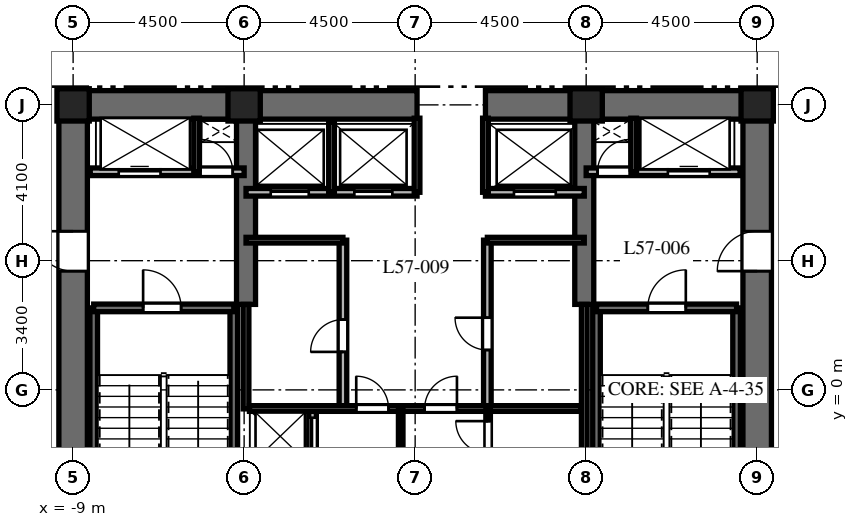
"""IFC4 building model, lengths in metres.
Left out: names, types, materials, properties, quantities, classifications, styles, units other than length and angle.
Written with IfcOpenShell. Run it as: python <this file> out.ifc"""

import sys

from ifc_helpers import new_model, si_unit, direction, frame, frame_2d, origin, origin_2d, place, context, subcontext, project, spatial, rectangle, extrude, element, fill, save


model = new_model("IFC4")
c1 = context("Model", 3, precision=1e-05, world=origin(), true_north=direction((0.0, 1.0)))
c2 = subcontext(c1, "Body", "Model", "MODEL_VIEW")
j1 = project(units=[si_unit("LENGTHUNIT", "METRE"), si_unit("PLANEANGLEUNIT", "RADIAN")], contexts=[c1])
p1 = place(None, origin())
s1 = spatial("IfcSite", under=j1, at=p1, CompositionType="ELEMENT")
p2 = place(p1, origin())
s2 = spatial("IfcBuilding", under=s1, at=p2, CompositionType="ELEMENT")
p3 = place(p2, frame((0.0, 0.0, 229.3)))
s3 = spatial("IfcBuildingStorey", under=s2, at=p3, CompositionType="ELEMENT", Elevation=229.3)
p4 = place(p3, frame((-9.375, 7.5, 0.0), z_axis=(0.0, 0.0, 1.0), x_axis=(1.0, 0.0, 0.0)))
e1 = element("IfcWall", 1, at=p4, inside=s3, PredefinedType="SHEAR", context=c2, shape_type="SweptSolid", body=[
    extrude(rectangle(XDim=9.425, YDim=0.75, at=frame_2d((4.712, 0.0))), origin(), (0.0, 0.0, 1.0), 3.8),
])
p5 = place(p3, frame((1.85, 7.5, 0.0), z_axis=(0.0, 0.0, 1.0), x_axis=(1.0, 0.0, 0.0)))
e2 = element("IfcWall", 2, at=p5, inside=s3, PredefinedType="SHEAR", context=c2, shape_type="SweptSolid", body=[
    extrude(rectangle(XDim=7.525, YDim=0.75, at=frame_2d((3.762, 0.0))), origin(), (0.0, 0.0, 1.0), 3.8),
])
p6 = place(p3, frame((-9.0, -7.125, 0.0), z_axis=(0.0, 0.0, 1.0), x_axis=(0.0, 1.0, 0.0)))
e3 = element("IfcWall", 3, at=p6, inside=s3, PredefinedType="SHEAR", context=c2, shape_type="SweptSolid", body=[
    extrude(rectangle(XDim=14.25, YDim=0.75, at=frame_2d((7.125, 0.0))), origin(), (0.0, 0.0, 1.0), 3.8),
])
p7 = place(p6, frame((10.25, 0.0, 0.0)))
e4 = element("IfcOpeningElement", 4, at=p7, cuts=e3, PredefinedType="OPENING", context=c2, shape_type="SweptSolid", body=[
    extrude(rectangle(XDim=1.05, YDim=2.15, at=frame_2d((0.525, 1.075))), frame((0.0, 0.385, 0.0), z_axis=(0.0, -1.0, 0.0), x_axis=(1.0, 0.0, 0.0)), (0.0, 0.0, 1.0), 0.77),
])
p8 = place(p3, frame((9.0, -7.125, 0.0), z_axis=(0.0, 0.0, 1.0), x_axis=(0.0, 1.0, 0.0)))
e5 = element("IfcWall", 5, at=p8, inside=s3, PredefinedType="SHEAR", context=c2, shape_type="SweptSolid", body=[
    extrude(rectangle(XDim=14.25, YDim=0.75, at=frame_2d((7.125, 0.0))), origin(), (0.0, 0.0, 1.0), 3.8),
])
p9 = place(p8, frame((10.25, 0.0, 0.0)))
e6 = element("IfcOpeningElement", 6, at=p9, cuts=e5, PredefinedType="OPENING", context=c2, shape_type="SweptSolid", body=[
    extrude(rectangle(XDim=1.05, YDim=2.15, at=frame_2d((0.525, 1.075))), frame((0.0, 0.385, 0.0), z_axis=(0.0, -1.0, 0.0), x_axis=(1.0, 0.0, 0.0)), (0.0, 0.0, 1.0), 0.77),
])
for number, where, z_axis, x_axis in (
    (7, (-4.45, 2.25, 0.0), (0.0, 0.0, 1.0), (0.0, 1.0, 0.0)),
    (8, (4.45, 2.25, 0.0), (0.0, 0.0, 1.0), (0.0, 1.0, 0.0)),
):
    element("IfcWall", number, at=place(p3, frame(where, z_axis=z_axis, x_axis=x_axis)), inside=s3, PredefinedType="SHEAR", context=c2, shape_type="SweptSolid", body=[
        extrude(rectangle(XDim=4.875, YDim=0.5, at=frame_2d((2.438, 0.0))), origin(), (0.0, 0.0, 1.0), 3.8),
    ])
for number, where, z_axis, x_axis in (
    (9, (-8.458, -6.985, 0.0), (0.0, 0.0, 1.0), (0.0, 1.0, 0.0)),
    (10, (-4.772, -6.985, 0.0), (0.0, 0.0, 1.0), (0.0, 1.0, 0.0)),
):
    element("IfcWall", number, at=place(p3, frame(where, z_axis=z_axis, x_axis=x_axis)), inside=s3, PredefinedType="SHEAR", context=c2, shape_type="SweptSolid", body=[
        extrude(rectangle(XDim=9.143, YDim=0.2, at=frame_2d((4.572, 0.0))), origin(), (0.0, 0.0, 1.0), 3.8),
    ])
p10 = place(p3, frame((-8.458, 2.158, 0.0), z_axis=(0.0, 0.0, 1.0), x_axis=(1.0, 0.0, 0.0)))
e11 = element("IfcWall", 11, at=p10, inside=s3, PredefinedType="SHEAR", context=c2, shape_type="SweptSolid", body=[
    extrude(rectangle(XDim=3.686, YDim=0.2, at=frame_2d((1.843, 0.0))), origin(), (0.0, 0.0, 1.0), 3.8),
])
p11 = place(p10, frame((1.3, 0.0, 0.0)))
e12 = element("IfcOpeningElement", 12, at=p11, cuts=e11, PredefinedType="OPENING", context=c2, shape_type="SweptSolid", body=[
    extrude(rectangle(XDim=1.0, YDim=2.15, at=frame_2d((0.5, 1.075))), frame((0.0, 0.11, 0.0), z_axis=(0.0, -1.0, 0.0), x_axis=(1.0, 0.0, 0.0)), (0.0, 0.0, 1.0), 0.22),
])
for number, where, z_axis, x_axis in (
    (13, (4.772, -6.985, 0.0), (0.0, 0.0, 1.0), (0.0, 1.0, 0.0)),
    (14, (8.458, -6.985, 0.0), (0.0, 0.0, 1.0), (0.0, 1.0, 0.0)),
):
    element("IfcWall", number, at=place(p3, frame(where, z_axis=z_axis, x_axis=x_axis)), inside=s3, PredefinedType="SHEAR", context=c2, shape_type="SweptSolid", body=[
        extrude(rectangle(XDim=9.143, YDim=0.2, at=frame_2d((4.572, 0.0))), origin(), (0.0, 0.0, 1.0), 3.8),
    ])
p12 = place(p3, frame((4.772, 2.158, 0.0), z_axis=(0.0, 0.0, 1.0), x_axis=(1.0, 0.0, 0.0)))
e15 = element("IfcWall", 15, at=p12, inside=s3, PredefinedType="SHEAR", context=c2, shape_type="SweptSolid", body=[
    extrude(rectangle(XDim=3.686, YDim=0.2, at=frame_2d((1.843, 0.0))), origin(), (0.0, 0.0, 1.0), 3.8),
])
p13 = place(p12, frame((1.35, 0.0, 0.0)))
e16 = element("IfcOpeningElement", 16, at=p13, cuts=e15, PredefinedType="OPENING", context=c2, shape_type="SweptSolid", body=[
    extrude(rectangle(XDim=1.0, YDim=2.15, at=frame_2d((0.5, 1.075))), frame((0.0, 0.11, 0.0), z_axis=(0.0, -1.0, 0.0), x_axis=(1.0, 0.0, 0.0)), (0.0, 0.0, 1.0), 0.22),
])
for number, where, z_axis, x_axis in (
    (17, (9.0, 7.5, 0.0), (0.0, 0.0, 1.0), (1.0, 0.0, 0.0)),
    (18, (4.5, 7.5, 0.0), (0.0, 0.0, 1.0), (1.0, 0.0, 0.0)),
    (19, (-4.5, 7.5, 0.0), (0.0, 0.0, 1.0), (1.0, 0.0, 0.0)),
    (20, (-9.0, 7.5, 0.0), (0.0, 0.0, 1.0), (1.0, 0.0, 0.0)),
):
    element("IfcColumn", number, at=place(p3, frame(where, z_axis=z_axis, x_axis=x_axis)), inside=s3, PredefinedType="COLUMN", context=c2, shape_type="SweptSolid", body=[
        extrude(rectangle(XDim=0.85, YDim=0.85, at=origin_2d()), origin(), (0.0, 0.0, 1.0), 3.8),
    ])
p14 = place(p3, frame((-8.55, 5.74, 0.0), z_axis=(0.0, 0.0, 1.0), x_axis=(1.0, 0.0, 0.0)))
e21 = element("IfcWall", 21, at=p14, inside=s3, PredefinedType="PARTITIONING", context=c2, shape_type="SweptSolid", body=[
    extrude(rectangle(XDim=4.05, YDim=0.2, at=frame_2d((2.025, 0.0))), origin(), (0.0, 0.0, 1.0), 3.5),
])
p15 = place(p14, frame((0.75, 0.0, 0.0)))
e22 = element("IfcOpeningElement", 22, at=p15, cuts=e21, PredefinedType="OPENING", context=c2, shape_type="SweptSolid", body=[
    extrude(rectangle(XDim=1.1, YDim=2.2, at=frame_2d((0.55, 1.1))), frame((0.0, 0.11, 0.0), z_axis=(0.0, -1.0, 0.0), x_axis=(1.0, 0.0, 0.0)), (0.0, 0.0, 1.0), 0.22),
])
p16 = place(p14, frame((2.9, 0.0, 0.0)))
e23 = element("IfcOpeningElement", 23, at=p16, cuts=e21, PredefinedType="OPENING", context=c2, shape_type="SweptSolid", body=[
    extrude(rectangle(XDim=0.85, YDim=2.03, at=frame_2d((0.425, 1.015))), frame((0.0, 0.11, 0.0), z_axis=(0.0, -1.0, 0.0), x_axis=(1.0, 0.0, 0.0)), (0.0, 0.0, 1.0), 0.22),
])
p17 = place(p3, frame((-5.75, 5.74, 0.0), z_axis=(0.0, 0.0, 1.0), x_axis=(0.0, 1.0, 0.0)))
e24 = element("IfcWall", 24, at=p17, inside=s3, PredefinedType="PARTITIONING", context=c2, shape_type="SweptSolid", body=[
    extrude(rectangle(XDim=1.41, YDim=0.15, at=frame_2d((0.705, 0.0))), origin(), (0.0, 0.0, 1.0), 3.5),
])
p18 = place(p3, frame((4.5, 5.74, 0.0), z_axis=(0.0, 0.0, 1.0), x_axis=(1.0, 0.0, 0.0)))
e25 = element("IfcWall", 25, at=p18, inside=s3, PredefinedType="PARTITIONING", context=c2, shape_type="SweptSolid", body=[
    extrude(rectangle(XDim=4.05, YDim=0.2, at=frame_2d((2.025, 0.0))), origin(), (0.0, 0.0, 1.0), 3.5),
])
p19 = place(p18, frame((0.3, 0.0, 0.0)))
e26 = element("IfcOpeningElement", 26, at=p19, cuts=e25, PredefinedType="OPENING", context=c2, shape_type="SweptSolid", body=[
    extrude(rectangle(XDim=0.85, YDim=2.03, at=frame_2d((0.425, 1.015))), frame((0.0, 0.11, 0.0), z_axis=(0.0, -1.0, 0.0), x_axis=(1.0, 0.0, 0.0)), (0.0, 0.0, 1.0), 0.22),
])
p20 = place(p18, frame((2.15, 0.0, 0.0)))
e27 = element("IfcOpeningElement", 27, at=p20, cuts=e25, PredefinedType="OPENING", context=c2, shape_type="SweptSolid", body=[
    extrude(rectangle(XDim=1.1, YDim=2.2, at=frame_2d((0.55, 1.1))), frame((0.0, 0.11, 0.0), z_axis=(0.0, -1.0, 0.0), x_axis=(1.0, 0.0, 0.0)), (0.0, 0.0, 1.0), 0.22),
])
p21 = place(p3, frame((5.75, 5.74, 0.0), z_axis=(0.0, 0.0, 1.0), x_axis=(0.0, 1.0, 0.0)))
e28 = element("IfcWall", 28, at=p21, inside=s3, PredefinedType="PARTITIONING", context=c2, shape_type="SweptSolid", body=[
    extrude(rectangle(XDim=1.41, YDim=0.15, at=frame_2d((0.705, 0.0))), origin(), (0.0, 0.0, 1.0), 3.5),
])
p22 = place(p3, frame((-2.7, -1.972, 0.0), z_axis=(0.0, 0.0, 1.0), x_axis=(0.0, 1.0, 0.0)))
e29 = element("IfcWall", 29, at=p22, inside=s3, PredefinedType="PARTITIONING", context=c2, shape_type="SweptSolid", body=[
    extrude(rectangle(XDim=1.472, YDim=0.2, at=frame_2d((0.736, 0.0))), origin(), (0.0, 0.0, 1.0), 3.5),
])
p23 = place(p22, frame((0.24, 0.0, 0.0)))
e30 = element("IfcOpeningElement", 30, at=p23, cuts=e29, PredefinedType="OPENING", context=c2, shape_type="SweptSolid", body=[
    extrude(rectangle(XDim=1.0, YDim=2.2, at=frame_2d((0.5, 1.1))), frame((0.0, 0.11, 0.0), z_axis=(0.0, -1.0, 0.0), x_axis=(1.0, 0.0, 0.0)), (0.0, 0.0, 1.0), 0.22),
])
p24 = place(p3, frame((-4.45, 5.2, 0.0), z_axis=(0.0, 0.0, 1.0), x_axis=(1.0, 0.0, 0.0)))
e31 = element("IfcWall", 31, at=p24, inside=s3, PredefinedType="PARTITIONING", context=c2, shape_type="SweptSolid", body=[
    extrude(rectangle(XDim=4.5, YDim=0.2, at=frame_2d((2.25, 0.0))), origin(), (0.0, 0.0, 1.0), 3.5),
])
p25 = place(p24, frame((0.65, 0.0, 0.0)))
e32 = element("IfcOpeningElement", 32, at=p25, cuts=e31, PredefinedType="OPENING", context=c2, shape_type="SweptSolid", body=[
    extrude(rectangle(XDim=1.0, YDim=2.2, at=frame_2d((0.5, 1.1))), frame((0.0, 0.11, 0.0), z_axis=(0.0, -1.0, 0.0), x_axis=(1.0, 0.0, 0.0)), (0.0, 0.0, 1.0), 0.22),
])
p26 = place(p24, frame((2.85, 0.0, 0.0)))
e33 = element("IfcOpeningElement", 33, at=p26, cuts=e31, PredefinedType="OPENING", context=c2, shape_type="SweptSolid", body=[
    extrude(rectangle(XDim=1.0, YDim=2.2, at=frame_2d((0.5, 1.1))), frame((0.0, 0.11, 0.0), z_axis=(0.0, -1.0, 0.0), x_axis=(1.0, 0.0, 0.0)), (0.0, 0.0, 1.0), 0.22),
])
p27 = place(p3, frame((1.85, 5.2, 0.0), z_axis=(0.0, 0.0, 1.0), x_axis=(1.0, 0.0, 0.0)))
e34 = element("IfcWall", 34, at=p27, inside=s3, PredefinedType="PARTITIONING", context=c2, shape_type="SweptSolid", body=[
    extrude(rectangle(XDim=2.6, YDim=0.2, at=frame_2d((1.3, 0.0))), origin(), (0.0, 0.0, 1.0), 3.5),
])
p28 = place(p27, frame((0.75, 0.0, 0.0)))
e35 = element("IfcOpeningElement", 35, at=p28, cuts=e34, PredefinedType="OPENING", context=c2, shape_type="SweptSolid", body=[
    extrude(rectangle(XDim=1.1, YDim=2.2, at=frame_2d((0.55, 1.1))), frame((0.0, 0.11, 0.0), z_axis=(0.0, -1.0, 0.0), x_axis=(1.0, 0.0, 0.0)), (0.0, 0.0, 1.0), 0.22),
])
p29 = place(p3, frame((-2.2, 5.2, 0.0), z_axis=(0.0, 0.0, 1.0), x_axis=(0.0, 1.0, 0.0)))
e36 = element("IfcWall", 36, at=p29, inside=s3, PredefinedType="PARTITIONING", context=c2, shape_type="SweptSolid", body=[
    extrude(rectangle(XDim=1.85, YDim=0.15, at=frame_2d((0.925, 0.0))), origin(), (0.0, 0.0, 1.0), 3.5),
])
for number, where, z_axis, x_axis in (
    (37, (0.05, 5.2, 0.0), (0.0, 0.0, 1.0), (0.0, 1.0, 0.0)),
    (38, (1.85, 5.2, 0.0), (0.0, 0.0, 1.0), (0.0, 1.0, 0.0)),
):
    element("IfcWall", number, at=place(p3, frame(where, z_axis=z_axis, x_axis=x_axis)), inside=s3, PredefinedType="PARTITIONING", context=c2, shape_type="SweptSolid", body=[
        extrude(rectangle(XDim=1.95, YDim=0.15, at=frame_2d((0.975, 0.0))), origin(), (0.0, 0.0, 1.0), 3.5),
    ])
p30 = place(p3, frame((-4.45, -0.5, 0.0), z_axis=(0.0, 0.0, 1.0), x_axis=(0.0, 1.0, 0.0)))
e39 = element("IfcWall", 39, at=p30, inside=s3, PredefinedType="PARTITIONING", context=c2, shape_type="SweptSolid", body=[
    extrude(rectangle(XDim=2.75, YDim=0.15, at=frame_2d((1.375, 0.0))), origin(), (0.0, 0.0, 1.0), 3.5),
])
p31 = place(p3, frame((4.45, -1.972, 0.0), z_axis=(0.0, 0.0, 1.0), x_axis=(0.0, 1.0, 0.0)))
e40 = element("IfcWall", 40, at=p31, inside=s3, PredefinedType="PARTITIONING", context=c2, shape_type="SweptSolid", body=[
    extrude(rectangle(XDim=4.222, YDim=0.15, at=frame_2d((2.111, 0.0))), origin(), (0.0, 0.0, 1.0), 3.5),
])
p32 = place(p3, frame((-1.9, -0.5, 0.0), z_axis=(0.0, 0.0, 1.0), x_axis=(0.0, 1.0, 0.0)))
e41 = element("IfcWall", 41, at=p32, inside=s3, PredefinedType="PARTITIONING", context=c2, shape_type="SweptSolid", body=[
    extrude(rectangle(XDim=4.44, YDim=0.2, at=frame_2d((2.22, 0.0))), origin(), (0.0, 0.0, 1.0), 3.5),
])
p33 = place(p32, frame((1.5, 0.0, 0.0)))
e42 = element("IfcOpeningElement", 42, at=p33, cuts=e41, PredefinedType="OPENING", context=c2, shape_type="SweptSolid", body=[
    extrude(rectangle(XDim=0.85, YDim=2.03, at=frame_2d((0.425, 1.015))), frame((0.0, 0.11, 0.0), z_axis=(0.0, -1.0, 0.0), x_axis=(1.0, 0.0, 0.0)), (0.0, 0.0, 1.0), 0.22),
])
p34 = place(p3, frame((-4.45, 3.94, 0.0), z_axis=(0.0, 0.0, 1.0), x_axis=(1.0, 0.0, 0.0)))
e43 = element("IfcWall", 43, at=p34, inside=s3, PredefinedType="PARTITIONING", context=c2, shape_type="SweptSolid", body=[
    extrude(rectangle(XDim=2.55, YDim=0.15, at=frame_2d((1.275, 0.0))), origin(), (0.0, 0.0, 1.0), 3.5),
])
p35 = place(p3, frame((1.9, -0.5, 0.0), z_axis=(0.0, 0.0, 1.0), x_axis=(0.0, 1.0, 0.0)))
e44 = element("IfcWall", 44, at=p35, inside=s3, PredefinedType="PARTITIONING", context=c2, shape_type="SweptSolid", body=[
    extrude(rectangle(XDim=4.44, YDim=0.2, at=frame_2d((2.22, 0.0))), origin(), (0.0, 0.0, 1.0), 3.5),
])
p36 = place(p35, frame((1.55, 0.0, 0.0)))
e45 = element("IfcOpeningElement", 45, at=p36, cuts=e44, PredefinedType="OPENING", context=c2, shape_type="SweptSolid", body=[
    extrude(rectangle(XDim=0.85, YDim=2.03, at=frame_2d((0.425, 1.015))), frame((0.0, 0.11, 0.0), z_axis=(0.0, -1.0, 0.0), x_axis=(1.0, 0.0, 0.0)), (0.0, 0.0, 1.0), 0.22),
])
p37 = place(p3, frame((1.9, 3.94, 0.0), z_axis=(0.0, 0.0, 1.0), x_axis=(1.0, 0.0, 0.0)))
e46 = element("IfcWall", 46, at=p37, inside=s3, PredefinedType="PARTITIONING", context=c2, shape_type="SweptSolid", body=[
    extrude(rectangle(XDim=2.55, YDim=0.15, at=frame_2d((1.275, 0.0))), origin(), (0.0, 0.0, 1.0), 3.5),
])
p38 = place(p3, frame((-4.36, -0.49, 0.0), z_axis=(0.0, 0.0, 1.0), x_axis=(1.0, 0.0, 0.0)))
e47 = element("IfcWall", 47, at=p38, inside=s3, PredefinedType="PARTITIONING", context=c2, shape_type="SweptSolid", body=[
    extrude(rectangle(XDim=8.72, YDim=0.15, at=frame_2d((4.36, 0.0))), origin(), (0.0, 0.0, 1.0), 3.5),
])
p39 = place(p38, frame((2.81, 0.0, 0.0)))
e48 = element("IfcOpeningElement", 48, at=p39, cuts=e47, PredefinedType="OPENING", context=c2, shape_type="SweptSolid", body=[
    extrude(rectangle(XDim=0.85, YDim=2.03, at=frame_2d((0.425, 1.015))), frame((0.0, 0.085, 0.0), z_axis=(0.0, -1.0, 0.0), x_axis=(1.0, 0.0, 0.0)), (0.0, 0.0, 1.0), 0.17),
])
p40 = place(p38, frame((4.61, 0.0, 0.0)))
e49 = element("IfcOpeningElement", 49, at=p40, cuts=e47, PredefinedType="OPENING", context=c2, shape_type="SweptSolid", body=[
    extrude(rectangle(XDim=0.85, YDim=2.03, at=frame_2d((0.425, 1.015))), frame((0.0, 0.085, 0.0), z_axis=(0.0, -1.0, 0.0), x_axis=(1.0, 0.0, 0.0)), (0.0, 0.0, 1.0), 0.17),
])
p41 = place(p3, frame((-0.38, -1.972, 0.0), z_axis=(0.0, 0.0, 1.0), x_axis=(0.0, 1.0, 0.0)))
e50 = element("IfcWall", 50, at=p41, inside=s3, PredefinedType="PARTITIONING", context=c2, shape_type="SweptSolid", body=[
    extrude(rectangle(XDim=1.472, YDim=0.12, at=frame_2d((0.736, 0.0))), origin(), (0.0, 0.0, 1.0), 3.5),
])
p42 = place(p3, frame((1.92, -1.972, 0.0), z_axis=(0.0, 0.0, 1.0), x_axis=(0.0, 1.0, 0.0)))
e51 = element("IfcWall", 51, at=p42, inside=s3, PredefinedType="PARTITIONING", context=c2, shape_type="SweptSolid", body=[
    extrude(rectangle(XDim=1.472, YDim=0.12, at=frame_2d((0.736, 0.0))), origin(), (0.0, 0.0, 1.0), 3.5),
])
p43 = place(p42, frame((0.3, 0.0, 0.0)))
e52 = element("IfcOpeningElement", 52, at=p43, cuts=e51, PredefinedType="OPENING", context=c2, shape_type="SweptSolid", body=[
    extrude(rectangle(XDim=0.85, YDim=2.03, at=frame_2d((0.425, 1.015))), frame((0.0, 0.07, 0.0), z_axis=(0.0, -1.0, 0.0), x_axis=(1.0, 0.0, 0.0)), (0.0, 0.0, 1.0), 0.14),
])
p44 = place(p11, origin())
e53 = element("IfcDoor", 53, at=p44, inside=s3, OperationType="SINGLE_SWING_LEFT", PredefinedType="DOOR", context=c2, shape_type="SweptSolid", body=[
    extrude(rectangle(XDim=1.0, YDim=2.15, at=frame_2d((0.5, 1.075))), frame((0.0, 0.025, 0.0), z_axis=(0.0, -1.0, 0.0), x_axis=(1.0, 0.0, 0.0)), (0.0, 0.0, 1.0), 0.05),
])
fill(e12, e53)
p45 = place(p13, origin())
e54 = element("IfcDoor", 54, at=p45, inside=s3, OperationType="SINGLE_SWING_RIGHT", PredefinedType="DOOR", context=c2, shape_type="SweptSolid", body=[
    extrude(rectangle(XDim=1.0, YDim=2.15, at=frame_2d((0.5, 1.075))), frame((0.0, 0.025, 0.0), z_axis=(0.0, -1.0, 0.0), x_axis=(1.0, 0.0, 0.0)), (0.0, 0.0, 1.0), 0.05),
])
fill(e16, e54)
p46 = place(p7, origin())
e55 = element("IfcDoor", 55, at=p46, inside=s3, OperationType="SINGLE_SWING_RIGHT", PredefinedType="DOOR", context=c2, shape_type="SweptSolid", body=[
    extrude(rectangle(XDim=1.05, YDim=2.15, at=frame_2d((0.525, 1.075))), frame((0.0, 0.025, 0.0), z_axis=(0.0, -1.0, 0.0), x_axis=(1.0, 0.0, 0.0)), (0.0, 0.0, 1.0), 0.05),
])
fill(e4, e55)
p47 = place(p9, origin())
e56 = element("IfcDoor", 56, at=p47, inside=s3, OperationType="SINGLE_SWING_LEFT", PredefinedType="DOOR", context=c2, shape_type="SweptSolid", body=[
    extrude(rectangle(XDim=1.05, YDim=2.15, at=frame_2d((0.525, 1.075))), frame((0.0, 0.025, 0.0), z_axis=(0.0, -1.0, 0.0), x_axis=(1.0, 0.0, 0.0)), (0.0, 0.0, 1.0), 0.05),
])
fill(e6, e56)
p48 = place(p15, origin())
e57 = element("IfcDoor", 57, at=p48, inside=s3, OperationType="SLIDING_TO_LEFT", PredefinedType="DOOR", context=c2, shape_type="SweptSolid", body=[
    extrude(rectangle(XDim=1.1, YDim=2.2, at=frame_2d((0.55, 1.1))), frame((0.0, 0.025, 0.0), z_axis=(0.0, -1.0, 0.0), x_axis=(1.0, 0.0, 0.0)), (0.0, 0.0, 1.0), 0.05),
])
fill(e22, e57)
p49 = place(p16, origin())
e58 = element("IfcDoor", 58, at=p49, inside=s3, OperationType="SINGLE_SWING_LEFT", PredefinedType="DOOR", context=c2, shape_type="SweptSolid", body=[
    extrude(rectangle(XDim=0.85, YDim=2.03, at=frame_2d((0.425, 1.015))), frame((0.0, 0.025, 0.0), z_axis=(0.0, -1.0, 0.0), x_axis=(1.0, 0.0, 0.0)), (0.0, 0.0, 1.0), 0.05),
])
fill(e23, e58)
p50 = place(p19, origin())
e59 = element("IfcDoor", 59, at=p50, inside=s3, OperationType="SINGLE_SWING_RIGHT", PredefinedType="DOOR", context=c2, shape_type="SweptSolid", body=[
    extrude(rectangle(XDim=0.85, YDim=2.03, at=frame_2d((0.425, 1.015))), frame((0.0, 0.025, 0.0), z_axis=(0.0, -1.0, 0.0), x_axis=(1.0, 0.0, 0.0)), (0.0, 0.0, 1.0), 0.05),
])
fill(e26, e59)
p51 = place(p20, origin())
e60 = element("IfcDoor", 60, at=p51, inside=s3, OperationType="SLIDING_TO_RIGHT", PredefinedType="DOOR", context=c2, shape_type="SweptSolid", body=[
    extrude(rectangle(XDim=1.1, YDim=2.2, at=frame_2d((0.55, 1.1))), frame((0.0, 0.025, 0.0), z_axis=(0.0, -1.0, 0.0), x_axis=(1.0, 0.0, 0.0)), (0.0, 0.0, 1.0), 0.05),
])
fill(e27, e60)
p52 = place(p23, origin())
e61 = element("IfcDoor", 61, at=p52, inside=s3, OperationType="SLIDING_TO_LEFT", PredefinedType="DOOR", context=c2, shape_type="SweptSolid", body=[
    extrude(rectangle(XDim=1.0, YDim=2.2, at=frame_2d((0.5, 1.1))), frame((0.0, 0.025, 0.0), z_axis=(0.0, -1.0, 0.0), x_axis=(1.0, 0.0, 0.0)), (0.0, 0.0, 1.0), 0.05),
])
fill(e30, e61)
p53 = place(p25, origin())
e62 = element("IfcDoor", 62, at=p53, inside=s3, OperationType="SLIDING_TO_LEFT", PredefinedType="DOOR", context=c2, shape_type="SweptSolid", body=[
    extrude(rectangle(XDim=1.0, YDim=2.2, at=frame_2d((0.5, 1.1))), frame((0.0, 0.025, 0.0), z_axis=(0.0, -1.0, 0.0), x_axis=(1.0, 0.0, 0.0)), (0.0, 0.0, 1.0), 0.05),
])
fill(e32, e62)
p54 = place(p26, origin())
e63 = element("IfcDoor", 63, at=p54, inside=s3, OperationType="SLIDING_TO_RIGHT", PredefinedType="DOOR", context=c2, shape_type="SweptSolid", body=[
    extrude(rectangle(XDim=1.0, YDim=2.2, at=frame_2d((0.5, 1.1))), frame((0.0, 0.025, 0.0), z_axis=(0.0, -1.0, 0.0), x_axis=(1.0, 0.0, 0.0)), (0.0, 0.0, 1.0), 0.05),
])
fill(e33, e63)
p55 = place(p28, origin())
e64 = element("IfcDoor", 64, at=p55, inside=s3, OperationType="SLIDING_TO_RIGHT", PredefinedType="DOOR", context=c2, shape_type="SweptSolid", body=[
    extrude(rectangle(XDim=1.1, YDim=2.2, at=frame_2d((0.55, 1.1))), frame((0.0, 0.025, 0.0), z_axis=(0.0, -1.0, 0.0), x_axis=(1.0, 0.0, 0.0)), (0.0, 0.0, 1.0), 0.05),
])
fill(e35, e64)
p56 = place(p33, origin())
e65 = element("IfcDoor", 65, at=p56, inside=s3, OperationType="SINGLE_SWING_LEFT", PredefinedType="DOOR", context=c2, shape_type="SweptSolid", body=[
    extrude(rectangle(XDim=0.85, YDim=2.03, at=frame_2d((0.425, 1.015))), frame((0.0, 0.025, 0.0), z_axis=(0.0, -1.0, 0.0), x_axis=(1.0, 0.0, 0.0)), (0.0, 0.0, 1.0), 0.05),
])
fill(e42, e65)
p57 = place(p36, origin())
e66 = element("IfcDoor", 66, at=p57, inside=s3, OperationType="SINGLE_SWING_RIGHT", PredefinedType="DOOR", context=c2, shape_type="SweptSolid", body=[
    extrude(rectangle(XDim=0.85, YDim=2.03, at=frame_2d((0.425, 1.015))), frame((0.0, 0.025, 0.0), z_axis=(0.0, -1.0, 0.0), x_axis=(1.0, 0.0, 0.0)), (0.0, 0.0, 1.0), 0.05),
])
fill(e45, e66)
p58 = place(p39, origin())
e67 = element("IfcDoor", 67, at=p58, inside=s3, OperationType="SINGLE_SWING_LEFT", PredefinedType="DOOR", context=c2, shape_type="SweptSolid", body=[
    extrude(rectangle(XDim=0.85, YDim=2.03, at=frame_2d((0.425, 1.015))), frame((0.0, 0.025, 0.0), z_axis=(0.0, -1.0, 0.0), x_axis=(1.0, 0.0, 0.0)), (0.0, 0.0, 1.0), 0.05),
])
fill(e48, e67)
p59 = place(p40, origin())
e68 = element("IfcDoor", 68, at=p59, inside=s3, OperationType="SINGLE_SWING_RIGHT", PredefinedType="DOOR", context=c2, shape_type="SweptSolid", body=[
    extrude(rectangle(XDim=0.85, YDim=2.03, at=frame_2d((0.425, 1.015))), frame((0.0, 0.025, 0.0), z_axis=(0.0, -1.0, 0.0), x_axis=(1.0, 0.0, 0.0)), (0.0, 0.0, 1.0), 0.05),
])
fill(e49, e68)
p60 = place(p43, origin())
e69 = element("IfcDoor", 69, at=p60, inside=s3, OperationType="SINGLE_SWING_RIGHT", PredefinedType="DOOR", context=c2, shape_type="SweptSolid", body=[
    extrude(rectangle(XDim=0.85, YDim=2.03, at=frame_2d((0.425, 1.015))), frame((0.0, 0.025, 0.0), z_axis=(0.0, -1.0, 0.0), x_axis=(1.0, 0.0, 0.0)), (0.0, 0.0, 1.0), 0.05),
])
fill(e52, e69)
save(model, sys.argv[1])
